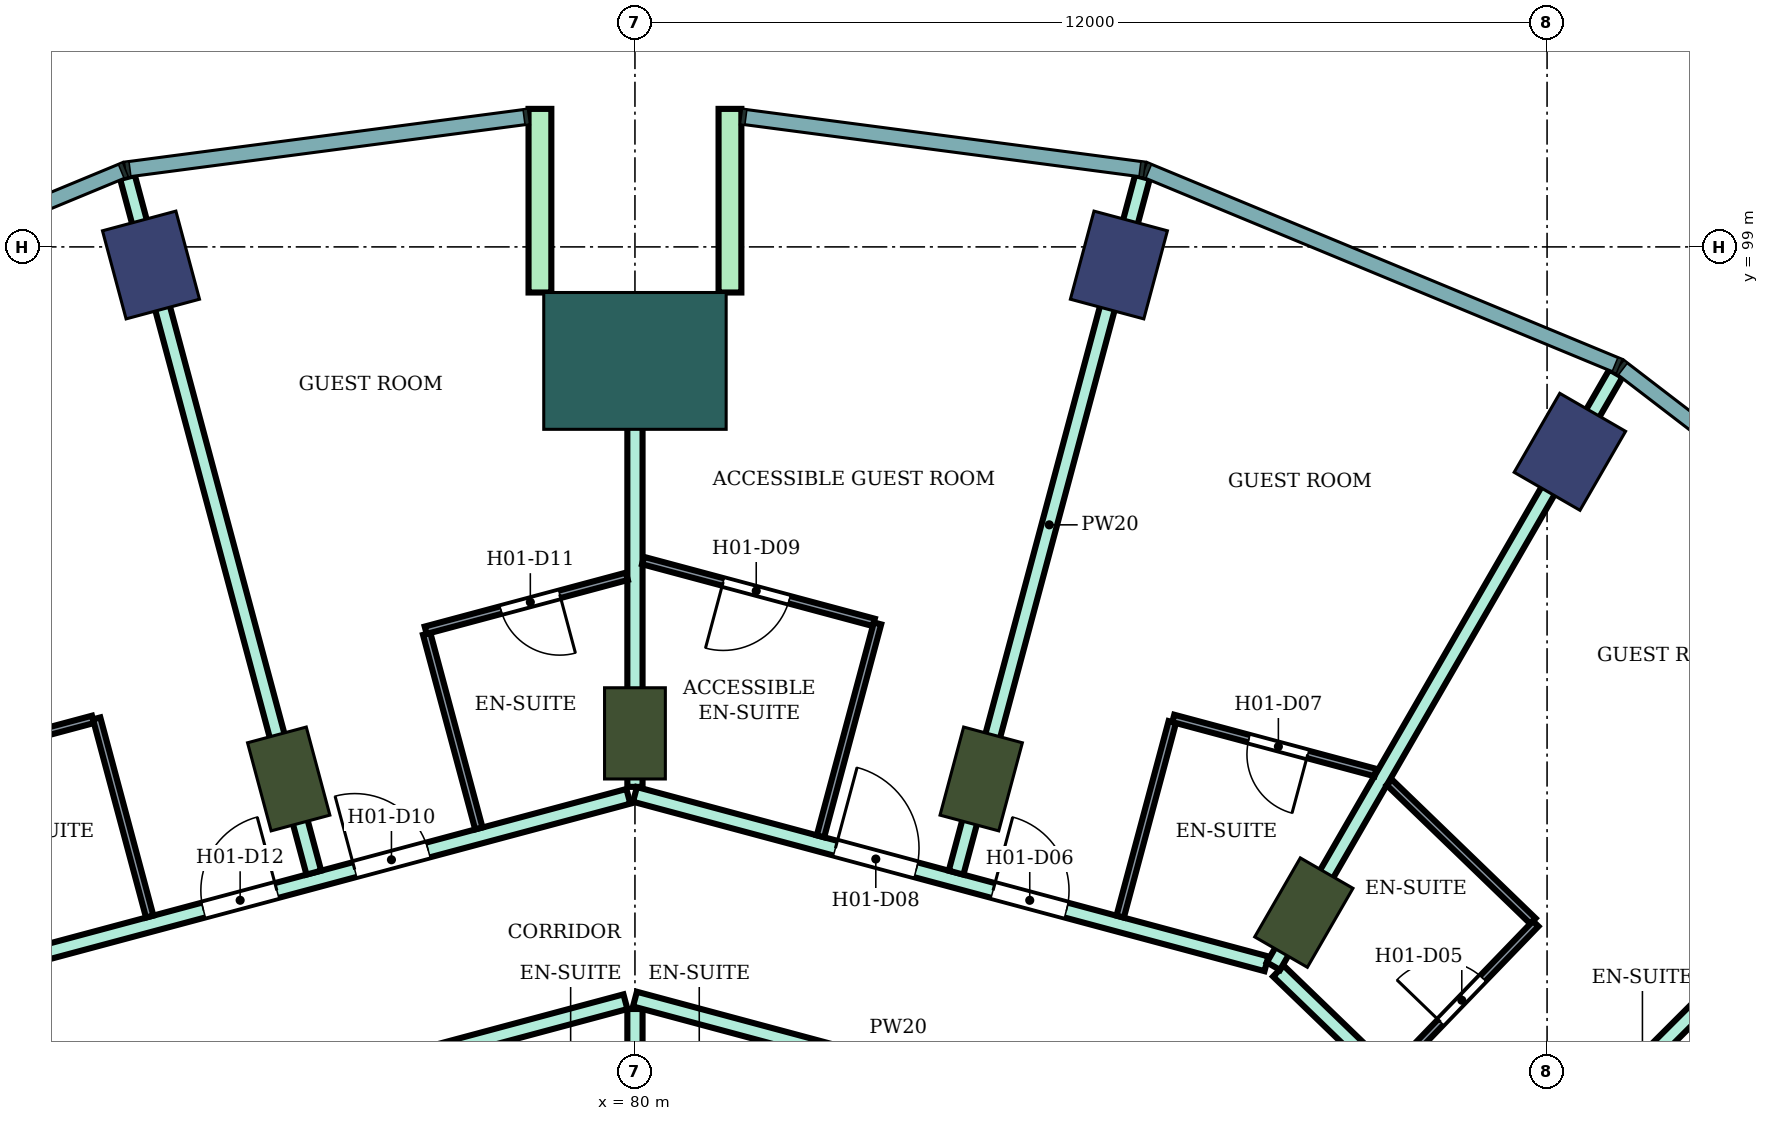
"""IFC4 building model, lengths in metres.
Left out: names, types, materials, properties, quantities, classifications, styles, units other than length and angle.
Written with IfcOpenShell. Run it as: python <this file> out.ifc"""

import sys

from ifc_helpers import new_model, si_unit, direction, frame, frame_2d, origin, origin_2d, place, context, subcontext, project, spatial, rectangle, extrude, element, fill, save


model = new_model("IFC4")
c1 = context("Model", 3, precision=1e-05, world=origin(), true_north=direction((0.0, 1.0)))
c2 = subcontext(c1, "Body", "Model", "MODEL_VIEW")
j1 = project(units=[si_unit("LENGTHUNIT", "METRE"), si_unit("PLANEANGLEUNIT", "RADIAN")], contexts=[c1])
p1 = place(None, origin())
s1 = spatial("IfcSite", under=j1, at=p1, CompositionType="ELEMENT")
p2 = place(p1, origin())
s2 = spatial("IfcBuilding", under=s1, at=p2, CompositionType="ELEMENT")
p3 = place(p2, frame((0.0, 0.0, 32.6)))
s3 = spatial("IfcBuildingStorey", under=s2, at=p3, CompositionType="ELEMENT", Elevation=32.6)
for number, where, z_axis, x_axis in (
    (1, (92.3, 96.304, 0.0), (0.0, 0.0, 1.0), (0.5, 0.866, 0.0)),
    (2, (86.367, 98.762, 0.0), (0.0, 0.0, 1.0), (0.259, 0.966, 0.0)),
    (3, (73.633, 98.762, 0.0), (0.0, 0.0, 1.0), (-0.259, 0.966, 0.0)),
):
    element("IfcColumn", number, at=place(p3, frame(where, z_axis=z_axis, x_axis=x_axis)), inside=s3, PredefinedType="COLUMN", context=c2, shape_type="SweptSolid", body=[
        extrude(rectangle(XDim=1.2, YDim=1.0, at=origin_2d()), origin(), (0.0, 0.0, 1.0), 3.8),
    ])
for number, where, z_axis, x_axis in (
    (4, (88.8, 90.242, 0.0), (0.0, 0.0, 1.0), (0.5, 0.866, 0.0)),
    (5, (84.555, 92.0, 0.0), (0.0, 0.0, 1.0), (0.259, 0.966, 0.0)),
    (6, (80.0, 92.6, 0.0), (0.0, 0.0, 1.0), (0.0, 1.0, 0.0)),
    (7, (75.445, 92.0, 0.0), (0.0, 0.0, 1.0), (-0.259, 0.966, 0.0)),
):
    element("IfcColumn", number, at=place(p3, frame(where, z_axis=z_axis, x_axis=x_axis)), inside=s3, PredefinedType="COLUMN", context=c2, shape_type="SweptSolid", body=[
        extrude(rectangle(XDim=1.2, YDim=0.8, at=origin_2d()), origin(), (0.0, 0.0, 1.0), 3.8),
    ])
p4 = place(p3, frame((80.0, 97.5, 0.0), z_axis=(0.0, 0.0, 1.0), x_axis=(0.0, 1.0, 0.0)))
e8 = element("IfcColumn", 8, at=p4, inside=s3, PredefinedType="COLUMN", context=c2, shape_type="SweptSolid", body=[
    extrude(rectangle(XDim=1.8, YDim=2.4, at=origin_2d()), origin(), (0.0, 0.0, 1.0), 3.8),
])
for number, where, z_axis, x_axis in (
    (9, (81.25, 98.4, 0.0), (0.0, 0.0, 1.0), (0.0, 1.0, 0.0)),
    (10, (78.75, 98.4, 0.0), (0.0, 0.0, 1.0), (0.0, 1.0, 0.0)),
):
    element("IfcWall", number, at=place(p3, frame(where, z_axis=z_axis, x_axis=x_axis)), inside=s3, PredefinedType="NOTDEFINED", context=c2, shape_type="SweptSolid", body=[
        extrude(rectangle(XDim=2.416, YDim=0.3, at=frame_2d((1.208, 0.0))), origin(), (0.0, 0.0, 1.0), 3.8),
    ])
p5 = place(p3, frame((71.614, 89.55, 0.0), z_axis=(0.0, 0.0, 1.0), x_axis=(0.965982156828, 0.258608725086, 0.0)))
e11 = element("IfcWall", 11, at=p5, inside=s3, PredefinedType="PARTITIONING", context=c2, shape_type="SweptSolid", body=[
    extrude(rectangle(XDim=8.592, YDim=0.2, at=frame_2d((4.296, 0.0))), origin(), (0.0, 0.0, 1.0), 3.35),
])
p6 = place(p5, frame((4.865, 0.0, 0.0)))
e12 = element("IfcOpeningElement", 12, at=p6, cuts=e11, PredefinedType="OPENING", context=c2, shape_type="SweptSolid", body=[
    extrude(rectangle(XDim=1.0, YDim=2.1, at=frame_2d((0.5, 1.05))), frame((0.0, 0.11, 0.0), z_axis=(0.0, -1.0, 0.0), x_axis=(1.0, 0.0, 0.0)), (0.0, 0.0, 1.0), 0.22),
])
p7 = place(p5, frame((2.804, 0.0, 0.0)))
e13 = element("IfcOpeningElement", 13, at=p7, cuts=e11, PredefinedType="OPENING", context=c2, shape_type="SweptSolid", body=[
    extrude(rectangle(XDim=1.0, YDim=2.1, at=frame_2d((0.5, 1.05))), frame((0.0, 0.11, 0.0), z_axis=(0.0, -1.0, 0.0), x_axis=(1.0, 0.0, 0.0)), (0.0, 0.0, 1.0), 0.22),
])
p8 = place(p3, frame((73.071, 87.247, 0.0), z_axis=(0.0, 0.0, 1.0), x_axis=(0.965931651205, 0.258797305243, 0.0)))
e14 = element("IfcWall", 14, at=p8, inside=s3, PredefinedType="PARTITIONING", context=c2, shape_type="SweptSolid", body=[
    extrude(rectangle(XDim=7.043, YDim=0.2, at=frame_2d((3.521, 0.0))), origin(), (0.0, 0.0, 1.0), 3.35),
])
p9 = place(p8, frame((0.41, 0.0, 0.0)))
e15 = element("IfcOpeningElement", 15, at=p9, cuts=e14, PredefinedType="OPENING", context=c2, shape_type="SweptSolid", body=[
    extrude(rectangle(XDim=1.0, YDim=2.1, at=frame_2d((0.5, 1.05))), frame((0.0, 0.11, 0.0), z_axis=(0.0, -1.0, 0.0), x_axis=(1.0, 0.0, 0.0)), (0.0, 0.0, 1.0), 0.22),
])
p10 = place(p3, frame((73.323, 99.919, 0.0), z_axis=(0.0, 0.0, 1.0), x_axis=(0.258817230439, -0.965926312525, 0.0)))
e16 = element("IfcWall", 16, at=p10, inside=s3, PredefinedType="PARTITIONING", context=c2, shape_type="SweptSolid", body=[
    extrude(rectangle(XDim=9.474, YDim=0.2, at=frame_2d((4.737, 0.0))), origin(), (0.0, 0.0, 1.0), 3.35),
])
p11 = place(p3, frame((80.0, 82.699, 0.0), z_axis=(0.0, 0.0, 1.0), x_axis=(0.0, 1.0, 0.0)))
e17 = element("IfcWall", 17, at=p11, inside=s3, PredefinedType="PARTITIONING", context=c2, shape_type="SweptSolid", body=[
    extrude(rectangle(XDim=6.275, YDim=0.2, at=frame_2d((3.138, 0.0))), origin(), (0.0, 0.0, 1.0), 3.35),
])
p12 = place(p3, frame((80.0, 89.104, 0.0), z_axis=(0.0, 0.0, 1.0), x_axis=(0.965856548257, -0.259077455964, 0.0)))
e18 = element("IfcWall", 18, at=p12, inside=s3, PredefinedType="PARTITIONING", context=c2, shape_type="SweptSolid", body=[
    extrude(rectangle(XDim=7.173, YDim=0.2, at=frame_2d((3.586, 0.0))), origin(), (0.0, 0.0, 1.0), 3.35),
])
p13 = place(p12, frame((5.763, 0.0, 0.0)))
e19 = element("IfcOpeningElement", 19, at=p13, cuts=e18, PredefinedType="OPENING", context=c2, shape_type="SweptSolid", body=[
    extrude(rectangle(XDim=1.0, YDim=2.1, at=frame_2d((0.5, 1.05))), frame((0.0, 0.11, 0.0), z_axis=(0.0, -1.0, 0.0), x_axis=(1.0, 0.0, 0.0)), (0.0, 0.0, 1.0), 0.22),
])
p14 = place(p3, frame((80.0, 91.896, 0.0), z_axis=(0.0, 0.0, 1.0), x_axis=(0.0, 1.0, 0.0)))
e20 = element("IfcWall", 20, at=p14, inside=s3, PredefinedType="PARTITIONING", context=c2, shape_type="SweptSolid", body=[
    extrude(rectangle(XDim=6.304, YDim=0.2, at=frame_2d((3.152, 0.0))), origin(), (0.0, 0.0, 1.0), 3.35),
])
p15 = place(p3, frame((80.0, 91.797, 0.0), z_axis=(0.0, 0.0, 1.0), x_axis=(0.965857042792, -0.259075612301, 0.0)))
e21 = element("IfcWall", 21, at=p15, inside=s3, PredefinedType="PARTITIONING", context=c2, shape_type="SweptSolid", body=[
    extrude(rectangle(XDim=8.602, YDim=0.2, at=frame_2d((4.301, 0.0))), origin(), (0.0, 0.0, 1.0), 3.35),
])
p16 = place(p15, frame((4.877, 0.0, 0.0)))
e22 = element("IfcOpeningElement", 22, at=p16, cuts=e21, PredefinedType="OPENING", context=c2, shape_type="SweptSolid", body=[
    extrude(rectangle(XDim=1.0, YDim=2.1, at=frame_2d((0.5, 1.05))), frame((0.0, 0.11, 0.0), z_axis=(0.0, -1.0, 0.0), x_axis=(1.0, 0.0, 0.0)), (0.0, 0.0, 1.0), 0.22),
])
p17 = place(p15, frame((2.73, 0.0, 0.0)))
e23 = element("IfcOpeningElement", 23, at=p17, cuts=e21, PredefinedType="OPENING", context=c2, shape_type="SweptSolid", body=[
    extrude(rectangle(XDim=1.1, YDim=2.1, at=frame_2d((0.55, 1.05))), frame((0.0, 0.11, 0.0), z_axis=(0.0, -1.0, 0.0), x_axis=(1.0, 0.0, 0.0)), (0.0, 0.0, 1.0), 0.22),
])
p18 = place(p3, frame((84.225, 90.768, 0.0), z_axis=(0.0, 0.0, 1.0), x_axis=(0.258817230439, 0.965926312525, 0.0)))
e24 = element("IfcWall", 24, at=p18, inside=s3, PredefinedType="PARTITIONING", context=c2, shape_type="SweptSolid", body=[
    extrude(rectangle(XDim=9.474, YDim=0.2, at=frame_2d((4.737, 0.0))), origin(), (0.0, 0.0, 1.0), 3.35),
])
p19 = place(p3, frame((88.465, 89.473, 0.0), z_axis=(0.0, 0.0, 1.0), x_axis=(0.719457552421, -0.694536413922, 0.0)))
e25 = element("IfcWall", 25, at=p19, inside=s3, PredefinedType="PARTITIONING", context=c2, shape_type="SweptSolid", body=[
    extrude(rectangle(XDim=6.524, YDim=0.2, at=frame_2d((3.262, 0.0))), origin(), (0.0, 0.0, 1.0), 3.35),
])
p20 = place(p19, frame((2.719, 0.0, 0.0)))
e26 = element("IfcOpeningElement", 26, at=p20, cuts=e25, PredefinedType="OPENING", context=c2, shape_type="SweptSolid", body=[
    extrude(rectangle(XDim=1.0, YDim=2.1, at=frame_2d((0.5, 1.05))), frame((0.0, 0.11, 0.0), z_axis=(0.0, -1.0, 0.0), x_axis=(1.0, 0.0, 0.0)), (0.0, 0.0, 1.0), 0.22),
])
p21 = place(p3, frame((88.4, 89.538, 0.0), z_axis=(0.0, 0.0, 1.0), x_axis=(0.5002401188, 0.865886726739, 0.0)))
e27 = element("IfcWall", 27, at=p21, inside=s3, PredefinedType="PARTITIONING", context=c2, shape_type="SweptSolid", body=[
    extrude(rectangle(XDim=9.008, YDim=0.2, at=frame_2d((4.504, 0.0))), origin(), (0.0, 0.0, 1.0), 3.35),
])
p22 = place(p3, frame((91.594, 86.591, 0.0), z_axis=(0.0, 0.0, 1.0), x_axis=(0.707214399597, 0.706999146394, 0.0)))
e28 = element("IfcWall", 28, at=p22, inside=s3, PredefinedType="PARTITIONING", context=c2, shape_type="SweptSolid", body=[
    extrude(rectangle(XDim=6.805, YDim=0.2, at=frame_2d((3.403, 0.0))), origin(), (0.0, 0.0, 1.0), 3.35),
])
p23 = place(p3, frame((70.268, 92.087, 0.0), z_axis=(0.0, 0.0, 1.0), x_axis=(0.965931867509, 0.258796497911, 0.0)))
e29 = element("IfcWall", 29, at=p23, inside=s3, PredefinedType="PARTITIONING", context=c2, shape_type="SweptSolid", body=[
    extrude(rectangle(XDim=2.693, YDim=0.1, at=frame_2d((1.347, 0.0))), origin(), (0.0, 0.0, 1.0), 3.35),
])
p24 = place(p23, frame((0.912, 0.0, 0.0)))
e30 = element("IfcOpeningElement", 30, at=p24, cuts=e29, PredefinedType="OPENING", context=c2, shape_type="SweptSolid", body=[
    extrude(rectangle(XDim=0.8, YDim=2.1, at=frame_2d((0.4, 1.05))), frame((0.0, 0.06, 0.0), z_axis=(0.0, -1.0, 0.0), x_axis=(1.0, 0.0, 0.0)), (0.0, 0.0, 1.0), 0.12),
])
p25 = place(p3, frame((72.918, 92.797, 0.0), z_axis=(0.0, 0.0, 1.0), x_axis=(0.25867580527, -0.965964195904, 0.0)))
e31 = element("IfcWall", 31, at=p25, inside=s3, PredefinedType="PARTITIONING", context=c2, shape_type="SweptSolid", body=[
    extrude(rectangle(XDim=2.699, YDim=0.1, at=frame_2d((1.35, 0.0))), origin(), (0.0, 0.0, 1.0), 3.35),
])
p26 = place(p3, frame((77.26, 93.909, 0.0), z_axis=(0.0, 0.0, 1.0), x_axis=(0.258935674139, -0.965894568086, 0.0)))
e32 = element("IfcWall", 32, at=p26, inside=s3, PredefinedType="PARTITIONING", context=c2, shape_type="SweptSolid", body=[
    extrude(rectangle(XDim=2.649, YDim=0.1, at=frame_2d((1.325, 0.0))), origin(), (0.0, 0.0, 1.0), 3.35),
])
p27 = place(p3, frame((77.247, 93.957, 0.0), z_axis=(0.0, 0.0, 1.0), x_axis=(0.965922199757, 0.258832579125, 0.0)))
e33 = element("IfcWall", 33, at=p27, inside=s3, PredefinedType="PARTITIONING", context=c2, shape_type="SweptSolid", body=[
    extrude(rectangle(XDim=2.74, YDim=0.1, at=frame_2d((1.37, 0.0))), origin(), (0.0, 0.0, 1.0), 3.35),
])
p28 = place(p27, frame((1.025, 0.0, 0.0)))
e34 = element("IfcOpeningElement", 34, at=p28, cuts=e33, PredefinedType="OPENING", context=c2, shape_type="SweptSolid", body=[
    extrude(rectangle(XDim=0.8, YDim=2.1, at=frame_2d((0.4, 1.05))), frame((0.0, 0.06, 0.0), z_axis=(0.0, -1.0, 0.0), x_axis=(1.0, 0.0, 0.0)), (0.0, 0.0, 1.0), 0.12),
])
p29 = place(p3, frame((80.106, 94.874, 0.0), z_axis=(0.0, 0.0, 1.0), x_axis=(0.965915808883, -0.258856427676, 0.0)))
e35 = element("IfcWall", 35, at=p29, inside=s3, PredefinedType="PARTITIONING", context=c2, shape_type="SweptSolid", body=[
    extrude(rectangle(XDim=3.144, YDim=0.1, at=frame_2d((1.572, 0.0))), origin(), (0.0, 0.0, 1.0), 3.35),
])
p30 = place(p29, frame((1.092, 0.0, 0.0)))
e36 = element("IfcOpeningElement", 36, at=p30, cuts=e35, PredefinedType="OPENING", context=c2, shape_type="SweptSolid", body=[
    extrude(rectangle(XDim=0.9, YDim=2.1, at=frame_2d((0.45, 1.05))), frame((0.0, 0.06, 0.0), z_axis=(0.0, -1.0, 0.0), x_axis=(1.0, 0.0, 0.0)), (0.0, 0.0, 1.0), 0.12),
])
p31 = place(p3, frame((82.441, 91.246, 0.0), z_axis=(0.0, 0.0, 1.0), x_axis=(0.258605640326, 0.965982982662, 0.0)))
e37 = element("IfcWall", 37, at=p31, inside=s3, PredefinedType="PARTITIONING", context=c2, shape_type="SweptSolid", body=[
    extrude(rectangle(XDim=2.9, YDim=0.1, at=frame_2d((1.45, 0.0))), origin(), (0.0, 0.0, 1.0), 3.35),
])
p32 = place(p3, frame((86.384, 90.19, 0.0), z_axis=(0.0, 0.0, 1.0), x_axis=(0.258677737588, 0.965963678446, 0.0)))
e38 = element("IfcWall", 38, at=p32, inside=s3, PredefinedType="PARTITIONING", context=c2, shape_type="SweptSolid", body=[
    extrude(rectangle(XDim=2.649, YDim=0.1, at=frame_2d((1.325, 0.0))), origin(), (0.0, 0.0, 1.0), 3.35),
])
p33 = place(p3, frame((87.082, 92.797, 0.0), z_axis=(0.0, 0.0, 1.0), x_axis=(0.965926679745, -0.258815859939, 0.0)))
e39 = element("IfcWall", 39, at=p33, inside=s3, PredefinedType="PARTITIONING", context=c2, shape_type="SweptSolid", body=[
    extrude(rectangle(XDim=2.753, YDim=0.1, at=frame_2d((1.377, 0.0))), origin(), (0.0, 0.0, 1.0), 3.35),
])
p34 = place(p33, frame((1.032, 0.0, 0.0)))
e40 = element("IfcOpeningElement", 40, at=p34, cuts=e39, PredefinedType="OPENING", context=c2, shape_type="SweptSolid", body=[
    extrude(rectangle(XDim=0.8, YDim=2.1, at=frame_2d((0.4, 1.05))), frame((0.0, 0.06, 0.0), z_axis=(0.0, -1.0, 0.0), x_axis=(1.0, 0.0, 0.0)), (0.0, 0.0, 1.0), 0.12),
])
p35 = place(p3, frame((89.925, 91.956, 0.0), z_axis=(0.0, 0.0, 1.0), x_axis=(0.71935982196, -0.694637636865, 0.0)))
e41 = element("IfcWall", 41, at=p35, inside=s3, PredefinedType="PARTITIONING", context=c2, shape_type="SweptSolid", body=[
    extrude(rectangle(XDim=2.627, YDim=0.1, at=frame_2d((1.313, 0.0))), origin(), (0.0, 0.0, 1.0), 3.35),
])
p36 = place(p3, frame((89.976, 88.154, 0.0), z_axis=(0.0, 0.0, 1.0), x_axis=(0.6945137956, 0.719479386585, 0.0)))
e42 = element("IfcWall", 42, at=p36, inside=s3, PredefinedType="PARTITIONING", context=c2, shape_type="SweptSolid", body=[
    extrude(rectangle(XDim=2.699, YDim=0.1, at=frame_2d((1.35, 0.0))), origin(), (0.0, 0.0, 1.0), 3.35),
])
p37 = place(p36, frame((0.9, 0.0, 0.0)))
e43 = element("IfcOpeningElement", 43, at=p37, cuts=e42, PredefinedType="OPENING", context=c2, shape_type="SweptSolid", body=[
    extrude(rectangle(XDim=0.8, YDim=2.1, at=frame_2d((0.4, 1.05))), frame((0.0, 0.06, 0.0), z_axis=(0.0, -1.0, 0.0), x_axis=(1.0, 0.0, 0.0)), (0.0, 0.0, 1.0), 0.12),
])
p38 = place(p37, origin())
e44 = element("IfcDoor", 44, at=p38, inside=s3, OperationType="SINGLE_SWING_LEFT", PredefinedType="DOOR", context=c2, shape_type="SweptSolid", body=[
    extrude(rectangle(XDim=0.8, YDim=2.1, at=frame_2d((0.4, 1.05))), frame((0.0, 0.025, 0.0), z_axis=(0.0, -1.0, 0.0), x_axis=(1.0, 0.0, 0.0)), (0.0, 0.0, 1.0), 0.05),
])
fill(e43, e44)
p39 = place(p16, origin())
e45 = element("IfcDoor", 45, at=p39, inside=s3, OperationType="SINGLE_SWING_LEFT", PredefinedType="DOOR", context=c2, shape_type="SweptSolid", body=[
    extrude(rectangle(XDim=1.0, YDim=2.1, at=frame_2d((0.5, 1.05))), frame((0.0, 0.025, 0.0), z_axis=(0.0, -1.0, 0.0), x_axis=(1.0, 0.0, 0.0)), (0.0, 0.0, 1.0), 0.05),
])
fill(e22, e45)
p40 = place(p34, frame((0.8, 0.0, 0.0), z_axis=(0.0, 0.0, 1.0), x_axis=(-1.0, 0.0, 0.0)))
e46 = element("IfcDoor", 46, at=p40, inside=s3, OperationType="SINGLE_SWING_LEFT", PredefinedType="DOOR", context=c2, shape_type="SweptSolid", body=[
    extrude(rectangle(XDim=0.8, YDim=2.1, at=frame_2d((0.4, 1.05))), frame((0.0, 0.025, 0.0), z_axis=(0.0, -1.0, 0.0), x_axis=(1.0, 0.0, 0.0)), (0.0, 0.0, 1.0), 0.05),
])
fill(e40, e46)
p41 = place(p17, origin())
e47 = element("IfcDoor", 47, at=p41, inside=s3, OperationType="SINGLE_SWING_LEFT", PredefinedType="DOOR", context=c2, shape_type="SweptSolid", body=[
    extrude(rectangle(XDim=1.1, YDim=2.1, at=frame_2d((0.55, 1.05))), frame((0.0, 0.025, 0.0), z_axis=(0.0, -1.0, 0.0), x_axis=(1.0, 0.0, 0.0)), (0.0, 0.0, 1.0), 0.05),
])
fill(e23, e47)
p42 = place(p30, frame((0.9, 0.0, 0.0), z_axis=(0.0, 0.0, 1.0), x_axis=(-1.0, 0.0, 0.0)))
e48 = element("IfcDoor", 48, at=p42, inside=s3, OperationType="SINGLE_SWING_RIGHT", PredefinedType="DOOR", context=c2, shape_type="SweptSolid", body=[
    extrude(rectangle(XDim=0.9, YDim=2.1, at=frame_2d((0.45, 1.05))), frame((0.0, 0.025, 0.0), z_axis=(0.0, -1.0, 0.0), x_axis=(1.0, 0.0, 0.0)), (0.0, 0.0, 1.0), 0.05),
])
fill(e36, e48)
p43 = place(p6, origin())
e49 = element("IfcDoor", 49, at=p43, inside=s3, OperationType="SINGLE_SWING_LEFT", PredefinedType="DOOR", context=c2, shape_type="SweptSolid", body=[
    extrude(rectangle(XDim=1.0, YDim=2.1, at=frame_2d((0.5, 1.05))), frame((0.0, 0.025, 0.0), z_axis=(0.0, -1.0, 0.0), x_axis=(1.0, 0.0, 0.0)), (0.0, 0.0, 1.0), 0.05),
])
fill(e12, e49)
p44 = place(p28, frame((0.8, 0.0, 0.0), z_axis=(0.0, 0.0, 1.0), x_axis=(-1.0, 0.0, 0.0)))
e50 = element("IfcDoor", 50, at=p44, inside=s3, OperationType="SINGLE_SWING_LEFT", PredefinedType="DOOR", context=c2, shape_type="SweptSolid", body=[
    extrude(rectangle(XDim=0.8, YDim=2.1, at=frame_2d((0.4, 1.05))), frame((0.0, 0.025, 0.0), z_axis=(0.0, -1.0, 0.0), x_axis=(1.0, 0.0, 0.0)), (0.0, 0.0, 1.0), 0.05),
])
fill(e34, e50)
p45 = place(p7, origin())
e51 = element("IfcDoor", 51, at=p45, inside=s3, OperationType="SINGLE_SWING_RIGHT", PredefinedType="DOOR", context=c2, shape_type="SweptSolid", body=[
    extrude(rectangle(XDim=1.0, YDim=2.1, at=frame_2d((0.5, 1.05))), frame((0.0, 0.025, 0.0), z_axis=(0.0, -1.0, 0.0), x_axis=(1.0, 0.0, 0.0)), (0.0, 0.0, 1.0), 0.05),
])
fill(e13, e51)
save(model, sys.argv[1])
